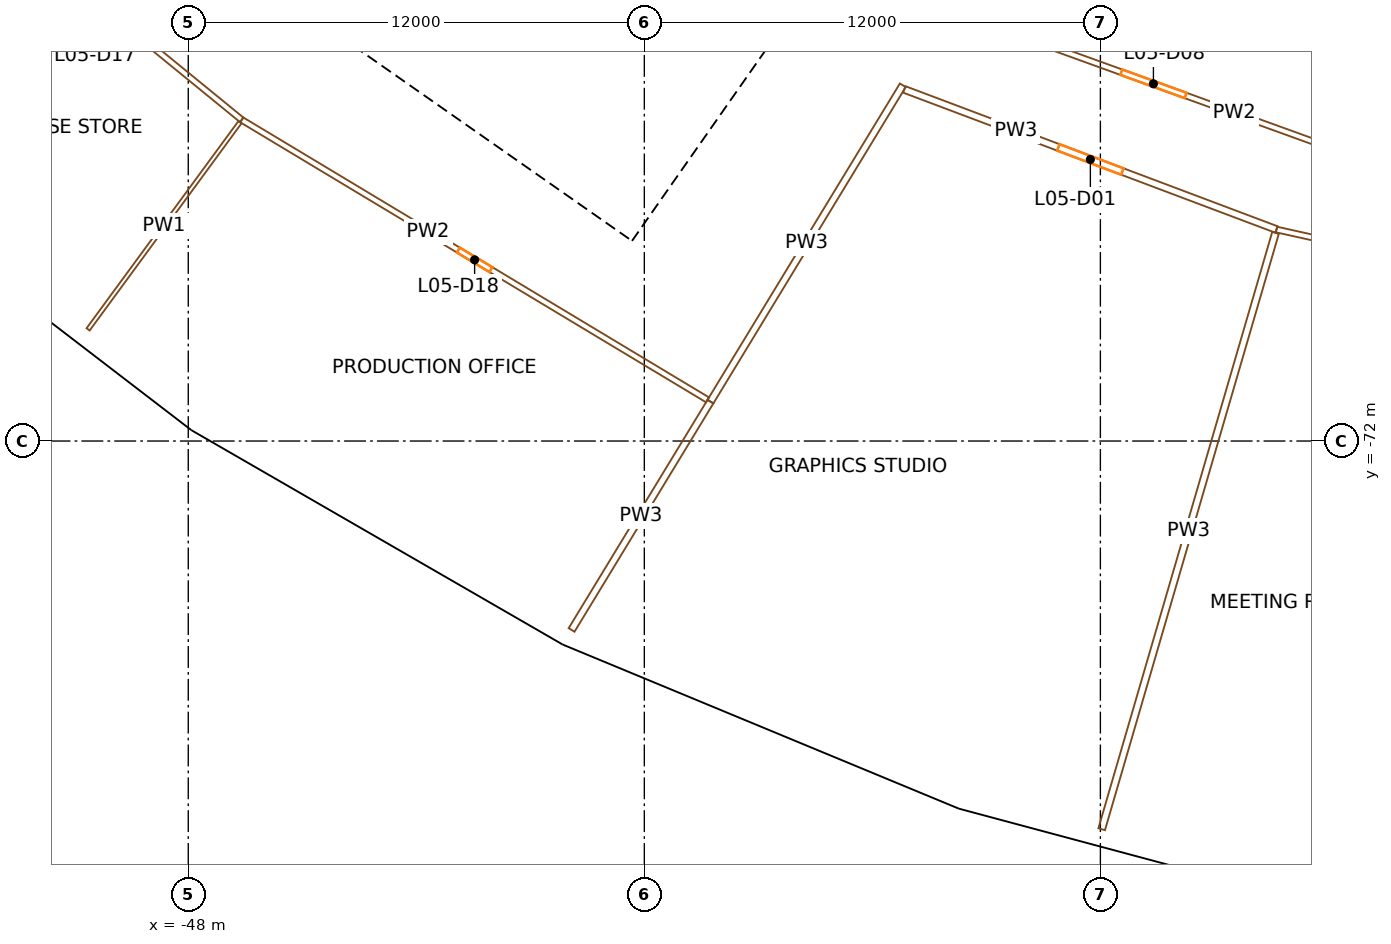
"""IFC4 building model, lengths in metres.
Left out: names, types, materials, properties, quantities, classifications, styles, units other than length and angle.
Written with IfcOpenShell. Run it as: python <this file> out.ifc"""

import sys

from ifc_helpers import new_model, si_unit, direction, frame, frame_2d, origin, origin_2d, place, context, subcontext, project, spatial, rectangle, extrude, element, fill, save


model = new_model("IFC4")
c1 = context("Model", 3, precision=1e-05, world=origin(), true_north=direction((0.0, 1.0)))
c2 = subcontext(c1, "Body", "Model", "MODEL_VIEW")
j1 = project(units=[si_unit("LENGTHUNIT", "METRE"), si_unit("PLANEANGLEUNIT", "RADIAN")], contexts=[c1])
p1 = place(None, origin())
s1 = spatial("IfcSite", under=j1, at=p1, CompositionType="ELEMENT")
p2 = place(p1, origin())
s2 = spatial("IfcBuilding", under=s1, at=p2, CompositionType="ELEMENT")
p3 = place(p2, frame((0.0, 0.0, 36.0)))
s3 = spatial("IfcBuildingStorey", under=s2, at=p3, CompositionType="ELEMENT", Elevation=36.0)
p4 = place(p3, frame((-43.196, -64.647, 0.0), z_axis=(0.0, 0.0, 1.0), x_axis=(0.831469612303, -0.55557023302, 0.0)))
e1 = element("IfcColumn", 1, at=p4, inside=s3, PredefinedType="COLUMN", context=c2, shape_type="SweptSolid", body=[
    extrude(rectangle(XDim=1.4, YDim=1.8, at=origin_2d()), origin(), (0.0, 0.0, 1.0), 4.5),
])
p5 = place(p3, frame((-47.362, -70.883, 0.0), z_axis=(0.0, 0.0, 1.0), x_axis=(0.831469612303, -0.55557023302, 0.0)))
e2 = element("IfcColumn", 2, at=p5, inside=s3, PredefinedType="COLUMN", context=c2, shape_type="SweptSolid", body=[
    extrude(rectangle(XDim=1.1, YDim=1.3, at=origin_2d()), origin(), (0.0, 0.0, 1.0), 4.5),
])
p6 = place(p3, frame((-34.388, -69.732, 0.0), z_axis=(0.0, 0.0, 1.0), x_axis=(0.896872741533, -0.442288690219, 0.0)))
e3 = element("IfcColumn", 3, at=p6, inside=s3, PredefinedType="COLUMN", context=c2, shape_type="SweptSolid", body=[
    extrude(rectangle(XDim=1.4, YDim=1.8, at=origin_2d()), origin(), (0.0, 0.0, 1.0), 4.5),
])
p7 = place(p3, frame((-37.705, -76.458, 0.0), z_axis=(0.0, 0.0, 1.0), x_axis=(0.896872741533, -0.442288690219, 0.0)))
e4 = element("IfcColumn", 4, at=p7, inside=s3, PredefinedType="COLUMN", context=c2, shape_type="SweptSolid", body=[
    extrude(rectangle(XDim=1.1, YDim=1.3, at=origin_2d()), origin(), (0.0, 0.0, 1.0), 4.5),
])
p8 = place(p3, frame((-24.992, -73.624, 0.0), z_axis=(0.0, 0.0, 1.0), x_axis=(0.946930129495, -0.321439465303, 0.0)))
e5 = element("IfcColumn", 5, at=p8, inside=s3, PredefinedType="COLUMN", context=c2, shape_type="SweptSolid", body=[
    extrude(rectangle(XDim=1.4, YDim=1.8, at=origin_2d()), origin(), (0.0, 0.0, 1.0), 4.5),
])
p9 = place(p3, frame((-27.403, -80.726, 0.0), z_axis=(0.0, 0.0, 1.0), x_axis=(0.946930129495, -0.321439465303, 0.0)))
e6 = element("IfcColumn", 6, at=p9, inside=s3, PredefinedType="COLUMN", context=c2, shape_type="SweptSolid", body=[
    extrude(rectangle(XDim=1.1, YDim=1.3, at=origin_2d()), origin(), (0.0, 0.0, 1.0), 4.5),
])
p10 = place(p3, frame((-36.717, -66.337, 0.0), z_axis=(0.0, 0.0, 1.0), x_axis=(0.573577477574, 0.819151315216, 0.0)))
e7 = element("IfcWall", 7, at=p10, inside=s3, PredefinedType="SHEAR", context=c2, shape_type="SweptSolid", body=[
    extrude(rectangle(XDim=14.8, YDim=0.9, at=frame_2d((7.4, 0.0))), origin(), (0.0, 0.0, 1.0), 4.2),
])
p11 = place(p10, frame((6.2, 0.0, 0.0)))
e8 = element("IfcOpeningElement", 8, at=p11, cuts=e7, PredefinedType="OPENING", context=c2, shape_type="SweptSolid", body=[
    extrude(rectangle(XDim=2.4, YDim=2.1, at=frame_2d((1.2, 1.05))), frame((0.0, 0.46, 0.0), z_axis=(0.0, -1.0, 0.0), x_axis=(1.0, 0.0, 0.0)), (0.0, 0.0, 1.0), 0.92),
])
p12 = place(p3, frame((-36.827, -65.71, 0.0), z_axis=(0.0, 0.0, 1.0), x_axis=(-0.819153391756, 0.573574511963, 0.0)))
e9 = element("IfcWall", 9, at=p12, inside=s3, PredefinedType="SHEAR", context=c2, shape_type="SweptSolid", body=[
    extrude(rectangle(XDim=15.045, YDim=0.9, at=frame_2d((7.523, 0.0))), origin(), (0.0, 0.0, 1.0), 4.2),
])
p13 = place(p12, frame((0.6, 0.0, 0.0)))
e10 = element("IfcOpeningElement", 10, at=p13, cuts=e9, PredefinedType="OPENING", context=c2, shape_type="SweptSolid", body=[
    extrude(rectangle(XDim=1.0, YDim=2.1, at=frame_2d((0.5, 1.05))), frame((0.0, 0.46, 0.0), z_axis=(0.0, -1.0, 0.0), x_axis=(1.0, 0.0, 0.0)), (0.0, 0.0, 1.0), 0.92),
])
p14 = place(p12, frame((3.275, 0.0, 0.0)))
e11 = element("IfcOpeningElement", 11, at=p14, cuts=e9, PredefinedType="OPENING", context=c2, shape_type="SweptSolid", body=[
    extrude(rectangle(XDim=1.0, YDim=2.1, at=frame_2d((0.5, 1.05))), frame((0.0, 0.46, 0.0), z_axis=(0.0, -1.0, 0.0), x_axis=(1.0, 0.0, 0.0)), (0.0, 0.0, 1.0), 0.92),
])
p15 = place(p12, frame((6.175, 0.0, 0.0)))
e12 = element("IfcOpeningElement", 12, at=p15, cuts=e9, PredefinedType="OPENING", context=c2, shape_type="SweptSolid", body=[
    extrude(rectangle(XDim=1.0, YDim=2.1, at=frame_2d((0.5, 1.05))), frame((0.0, 0.46, 0.0), z_axis=(0.0, -1.0, 0.0), x_axis=(1.0, 0.0, 0.0)), (0.0, 0.0, 1.0), 0.92),
])
p16 = place(p12, frame((13.495, 0.0, 0.0)))
e13 = element("IfcOpeningElement", 13, at=p16, cuts=e9, PredefinedType="OPENING", context=c2, shape_type="SweptSolid", body=[
    extrude(rectangle(XDim=1.1, YDim=2.1, at=frame_2d((0.55, 1.05))), frame((0.0, 0.46, 0.0), z_axis=(0.0, -1.0, 0.0), x_axis=(1.0, 0.0, 0.0)), (0.0, 0.0, 1.0), 0.92),
])
p17 = place(p3, frame((-35.221, -63.417, 0.0), z_axis=(0.0, 0.0, 1.0), x_axis=(-0.819166993208, 0.573555086491, 0.0)))
e14 = element("IfcWall", 14, at=p17, inside=s3, PredefinedType="SOLIDWALL", context=c2, shape_type="SweptSolid", body=[
    extrude(rectangle(XDim=7.95, YDim=0.3, at=frame_2d((3.975, 0.0))), origin(), (0.0, 0.0, 1.0), 4.2),
])
p18 = place(p3, frame((-35.635, -60.258, 0.0), z_axis=(0.0, 0.0, 1.0), x_axis=(-0.573581496053, -0.819148501424, 0.0)))
e15 = element("IfcWall", 15, at=p18, inside=s3, PredefinedType="PARTITIONING", context=c2, shape_type="SweptSolid", body=[
    extrude(rectangle(XDim=2.2, YDim=0.15, at=frame_2d((1.1, 0.0))), origin(), (0.0, 0.0, 1.0), 4.2),
])
for number, where, z_axis, x_axis in (
    (16, (-37.15, -62.249, 0.0), (0.0, 0.0, 1.0), (-0.574, -0.819, 0.0)),
    (17, (-39.649, -60.5, 0.0), (0.0, 0.0, 1.0), (-0.574, -0.819, 0.0)),
):
    element("IfcWall", number, at=place(p3, frame(where, z_axis=z_axis, x_axis=x_axis)), inside=s3, PredefinedType="PLUMBINGWALL", context=c2, shape_type="SweptSolid", body=[
        extrude(rectangle(XDim=2.2, YDim=0.1, at=frame_2d((1.1, 0.0))), origin(), (0.0, 0.0, 1.0), 4.2),
    ])
p19 = place(p3, frame((-56.673, -64.713, 0.0), z_axis=(0.0, 0.0, 1.0), x_axis=(0.793355377778, -0.608758773695, 0.0)))
e18 = element("IfcWall", 18, at=p19, inside=s3, PredefinedType="SOLIDWALL", context=c2, shape_type="SweptSolid", body=[
    extrude(rectangle(XDim=11.135, YDim=0.45, at=frame_2d((5.567, 0.0))), origin(), (0.0, 0.0, 1.0), 3.2),
])
p20 = place(p19, frame((3.917, 0.0, 0.9)))
e19 = element("IfcOpeningElement", 19, at=p20, cuts=e18, PredefinedType="OPENING", context=c2, shape_type="SweptSolid", body=[
    extrude(rectangle(XDim=1.2, YDim=2.15, at=frame_2d((0.6, 1.075))), frame((0.0, 0.235, 0.0), z_axis=(0.0, -1.0, 0.0), x_axis=(1.0, 0.0, 0.0)), (0.0, 0.0, 1.0), 0.47),
])
p21 = place(p19, frame((6.017, 0.0, 0.9)))
e20 = element("IfcOpeningElement", 20, at=p21, cuts=e18, PredefinedType="OPENING", context=c2, shape_type="SweptSolid", body=[
    extrude(rectangle(XDim=1.2, YDim=2.15, at=frame_2d((0.6, 1.075))), frame((0.0, 0.235, 0.0), z_axis=(0.0, -1.0, 0.0), x_axis=(1.0, 0.0, 0.0)), (0.0, 0.0, 1.0), 0.47),
])
p22 = place(p3, frame((-47.819, -71.512, 0.0), z_axis=(0.0, 0.0, 1.0), x_axis=(0.866024577697, -0.500001430823, 0.0)))
e21 = element("IfcWall", 21, at=p22, inside=s3, PredefinedType="SOLIDWALL", context=c2, shape_type="SweptSolid", body=[
    extrude(rectangle(XDim=11.312, YDim=0.45, at=frame_2d((5.656, 0.0))), origin(), (0.0, 0.0, 1.0), 3.2),
])
p23 = place(p22, frame((4.006, 0.0, 0.9)))
e22 = element("IfcOpeningElement", 22, at=p23, cuts=e21, PredefinedType="OPENING", context=c2, shape_type="SweptSolid", body=[
    extrude(rectangle(XDim=1.2, YDim=2.15, at=frame_2d((0.6, 1.075))), frame((0.0, 0.235, 0.0), z_axis=(0.0, -1.0, 0.0), x_axis=(1.0, 0.0, 0.0)), (0.0, 0.0, 1.0), 0.47),
])
p24 = place(p22, frame((6.106, 0.0, 0.9)))
e23 = element("IfcOpeningElement", 23, at=p24, cuts=e21, PredefinedType="OPENING", context=c2, shape_type="SweptSolid", body=[
    extrude(rectangle(XDim=1.2, YDim=2.15, at=frame_2d((0.6, 1.075))), frame((0.0, 0.235, 0.0), z_axis=(0.0, -1.0, 0.0), x_axis=(1.0, 0.0, 0.0)), (0.0, 0.0, 1.0), 0.47),
])
p25 = place(p3, frame((-37.993, -77.176, 0.0), z_axis=(0.0, 0.0, 1.0), x_axis=(0.923874126662, -0.382696482978, 0.0)))
e24 = element("IfcWall", 24, at=p25, inside=s3, PredefinedType="SOLIDWALL", context=c2, shape_type="SweptSolid", body=[
    extrude(rectangle(XDim=11.135, YDim=0.45, at=frame_2d((5.567, 0.0))), origin(), (0.0, 0.0, 1.0), 3.2),
])
p26 = place(p25, frame((3.917, 0.0, 0.9)))
e25 = element("IfcOpeningElement", 25, at=p26, cuts=e24, PredefinedType="OPENING", context=c2, shape_type="SweptSolid", body=[
    extrude(rectangle(XDim=1.2, YDim=2.15, at=frame_2d((0.6, 1.075))), frame((0.0, 0.235, 0.0), z_axis=(0.0, -1.0, 0.0), x_axis=(1.0, 0.0, 0.0)), (0.0, 0.0, 1.0), 0.47),
])
p27 = place(p25, frame((6.017, 0.0, 0.9)))
e26 = element("IfcOpeningElement", 26, at=p27, cuts=e24, PredefinedType="OPENING", context=c2, shape_type="SweptSolid", body=[
    extrude(rectangle(XDim=1.2, YDim=2.15, at=frame_2d((0.6, 1.075))), frame((0.0, 0.235, 0.0), z_axis=(0.0, -1.0, 0.0), x_axis=(1.0, 0.0, 0.0)), (0.0, 0.0, 1.0), 0.47),
])
p28 = place(p3, frame((-27.681, -81.451, 0.0), z_axis=(0.0, 0.0, 1.0), x_axis=(0.965923678926, -0.258827059038, 0.0)))
e27 = element("IfcWall", 27, at=p28, inside=s3, PredefinedType="SOLIDWALL", context=c2, shape_type="SweptSolid", body=[
    extrude(rectangle(XDim=11.312, YDim=0.45, at=frame_2d((5.656, 0.0))), origin(), (0.0, 0.0, 1.0), 3.2),
])
p29 = place(p28, frame((4.006, 0.0, 0.9)))
e28 = element("IfcOpeningElement", 28, at=p29, cuts=e27, PredefinedType="OPENING", context=c2, shape_type="SweptSolid", body=[
    extrude(rectangle(XDim=1.2, YDim=2.15, at=frame_2d((0.6, 1.075))), frame((0.0, 0.235, 0.0), z_axis=(0.0, -1.0, 0.0), x_axis=(1.0, 0.0, 0.0)), (0.0, 0.0, 1.0), 0.47),
])
p30 = place(p28, frame((6.106, 0.0, 0.9)))
e29 = element("IfcOpeningElement", 29, at=p30, cuts=e27, PredefinedType="OPENING", context=c2, shape_type="SweptSolid", body=[
    extrude(rectangle(XDim=1.2, YDim=2.15, at=frame_2d((0.6, 1.075))), frame((0.0, 0.235, 0.0), z_axis=(0.0, -1.0, 0.0), x_axis=(1.0, 0.0, 0.0)), (0.0, 0.0, 1.0), 0.47),
])
p31 = place(p3, frame((-46.594, -63.549, 0.0), z_axis=(0.0, 0.0, 1.0), x_axis=(-0.774664810718, 0.632372066931, 0.0)))
e30 = element("IfcWall", 30, at=p31, inside=s3, PredefinedType="PARTITIONING", context=c2, shape_type="SweptSolid", body=[
    extrude(rectangle(XDim=8.112, YDim=0.15, at=frame_2d((4.056, 0.0))), origin(), (0.0, 0.0, 1.0), 3.1),
])
p32 = place(p31, frame((3.556, 0.0, 0.0)))
e31 = element("IfcOpeningElement", 31, at=p32, cuts=e30, PredefinedType="OPENING", context=c2, shape_type="SweptSolid", body=[
    extrude(rectangle(XDim=1.0, YDim=2.1, at=frame_2d((0.5, 1.05))), frame((0.0, 0.085, 0.0), z_axis=(0.0, -1.0, 0.0), x_axis=(1.0, 0.0, 0.0)), (0.0, 0.0, 1.0), 0.17),
])
p33 = place(p3, frame((-50.635, -69.062, 0.0), z_axis=(0.0, 0.0, 1.0), x_axis=(0.591304174152, 0.806448618097, 0.0)))
e32 = element("IfcWall", 32, at=p33, inside=s3, PredefinedType="PARTITIONING", context=c2, shape_type="SweptSolid", body=[
    extrude(rectangle(XDim=6.761, YDim=0.1, at=frame_2d((3.38, 0.0))), origin(), (0.0, 0.0, 1.0), 3.1),
])
p34 = place(p3, frame((-34.337, -70.916, 0.0), z_axis=(0.0, 0.0, 1.0), x_axis=(-0.857079893963, 0.515183516199, 0.0)))
e33 = element("IfcWall", 33, at=p34, inside=s3, PredefinedType="PARTITIONING", context=c2, shape_type="SweptSolid", body=[
    extrude(rectangle(XDim=14.3, YDim=0.15, at=frame_2d((7.15, 0.0))), origin(), (0.0, 0.0, 1.0), 3.1),
])
p35 = place(p34, frame((6.65, 0.0, 0.0)))
e34 = element("IfcOpeningElement", 34, at=p35, cuts=e33, PredefinedType="OPENING", context=c2, shape_type="SweptSolid", body=[
    extrude(rectangle(XDim=1.0, YDim=2.1, at=frame_2d((0.5, 1.05))), frame((0.0, 0.085, 0.0), z_axis=(0.0, -1.0, 0.0), x_axis=(1.0, 0.0, 0.0)), (0.0, 0.0, 1.0), 0.17),
])
p36 = place(p3, frame((-34.26, -70.963, 0.0), z_axis=(0.0, 0.0, 1.0), x_axis=(-0.519582317334, -0.854420397412, 0.0)))
e35 = element("IfcWall", 35, at=p36, inside=s3, PredefinedType="PARTITIONING", context=c2, shape_type="SweptSolid", body=[
    extrude(rectangle(XDim=7.032, YDim=0.18, at=frame_2d((3.516, 0.0))), origin(), (0.0, 0.0, 1.0), 3.1),
])
p37 = place(p3, frame((-29.199, -62.639, 0.0), z_axis=(0.0, 0.0, 1.0), x_axis=(-0.519569231187, -0.854428355103, 0.0)))
e36 = element("IfcWall", 36, at=p37, inside=s3, PredefinedType="PARTITIONING", context=c2, shape_type="SweptSolid", body=[
    extrude(rectangle(XDim=9.741, YDim=0.18, at=frame_2d((4.871, 0.0))), origin(), (0.0, 0.0, 1.0), 3.1),
])
p38 = place(p3, frame((-19.366, -66.435, 0.0), z_axis=(0.0, 0.0, 1.0), x_axis=(-0.935901890315, 0.352260772305, 0.0)))
e37 = element("IfcWall", 37, at=p38, inside=s3, PredefinedType="PARTITIONING", context=c2, shape_type="SweptSolid", body=[
    extrude(rectangle(XDim=10.466, YDim=0.18, at=frame_2d((5.233, 0.0))), origin(), (0.0, 0.0, 1.0), 3.1),
])
p39 = place(p38, frame((4.333, 0.0, 0.0)))
e38 = element("IfcOpeningElement", 38, at=p39, cuts=e37, PredefinedType="OPENING", context=c2, shape_type="SweptSolid", body=[
    extrude(rectangle(XDim=1.8, YDim=2.4, at=frame_2d((0.9, 1.2))), frame((0.0, 0.1, 0.0), z_axis=(0.0, -1.0, 0.0), x_axis=(1.0, 0.0, 0.0)), (0.0, 0.0, 1.0), 0.2),
])
p40 = place(p3, frame((-27.92, -60.678, 0.0), z_axis=(0.0, 0.0, 1.0), x_axis=(0.940369024046, -0.340155991589, 0.0)))
e39 = element("IfcWall", 39, at=p40, inside=s3, PredefinedType="PARTITIONING", context=c2, shape_type="SweptSolid", body=[
    extrude(rectangle(XDim=11.305, YDim=0.15, at=frame_2d((5.652, 0.0))), origin(), (0.0, 0.0, 1.0), 3.1),
])
p41 = place(p40, frame((4.752, 0.0, 0.0)))
e40 = element("IfcOpeningElement", 40, at=p41, cuts=e39, PredefinedType="OPENING", context=c2, shape_type="SweptSolid", body=[
    extrude(rectangle(XDim=1.8, YDim=2.1, at=frame_2d((0.9, 1.05))), frame((0.0, 0.085, 0.0), z_axis=(0.0, -1.0, 0.0), x_axis=(1.0, 0.0, 0.0)), (0.0, 0.0, 1.0), 0.17),
])
p42 = place(p3, frame((-23.966, -82.214, 0.0), z_axis=(0.0, 0.0, 1.0), x_axis=(0.279852024748, 0.960043147074, 0.0)))
e41 = element("IfcWall", 41, at=p42, inside=s3, PredefinedType="PARTITIONING", context=c2, shape_type="SweptSolid", body=[
    extrude(rectangle(XDim=16.346, YDim=0.18, at=frame_2d((8.173, 0.0))), origin(), (0.0, 0.0, 1.0), 3.1),
])
p43 = place(p3, frame((-10.529, -68.394, 0.0), z_axis=(0.0, 0.0, 1.0), x_axis=(-0.976288493125, 0.216473504595, 0.0)))
e42 = element("IfcWall", 42, at=p43, inside=s3, PredefinedType="PARTITIONING", context=c2, shape_type="SweptSolid", body=[
    extrude(rectangle(XDim=9.052, YDim=0.15, at=frame_2d((4.526, 0.0))), origin(), (0.0, 0.0, 1.0), 3.1),
])
p44 = place(p43, frame((3.626, 0.0, 0.0)))
e43 = element("IfcOpeningElement", 43, at=p44, cuts=e42, PredefinedType="OPENING", context=c2, shape_type="SweptSolid", body=[
    extrude(rectangle(XDim=1.8, YDim=2.1, at=frame_2d((0.9, 1.05))), frame((0.0, 0.085, 0.0), z_axis=(0.0, -1.0, 0.0), x_axis=(1.0, 0.0, 0.0)), (0.0, 0.0, 1.0), 0.17),
])
p45 = place(p13, origin())
e44 = element("IfcDoor", 44, at=p45, inside=s3, OperationType="SINGLE_SWING_RIGHT", PredefinedType="DOOR", context=c2, shape_type="SweptSolid", body=[
    extrude(rectangle(XDim=1.0, YDim=2.1, at=frame_2d((0.5, 1.05))), frame((0.0, 0.025, 0.0), z_axis=(0.0, -1.0, 0.0), x_axis=(1.0, 0.0, 0.0)), (0.0, 0.0, 1.0), 0.05),
])
fill(e10, e44)
p46 = place(p14, origin())
e45 = element("IfcDoor", 45, at=p46, inside=s3, OperationType="SINGLE_SWING_LEFT", PredefinedType="DOOR", context=c2, shape_type="SweptSolid", body=[
    extrude(rectangle(XDim=1.0, YDim=2.1, at=frame_2d((0.5, 1.05))), frame((0.0, 0.025, 0.0), z_axis=(0.0, -1.0, 0.0), x_axis=(1.0, 0.0, 0.0)), (0.0, 0.0, 1.0), 0.05),
])
fill(e11, e45)
p47 = place(p15, origin())
e46 = element("IfcDoor", 46, at=p47, inside=s3, OperationType="SINGLE_SWING_RIGHT", PredefinedType="DOOR", context=c2, shape_type="SweptSolid", body=[
    extrude(rectangle(XDim=1.0, YDim=2.1, at=frame_2d((0.5, 1.05))), frame((0.0, 0.025, 0.0), z_axis=(0.0, -1.0, 0.0), x_axis=(1.0, 0.0, 0.0)), (0.0, 0.0, 1.0), 0.05),
])
fill(e12, e46)
p48 = place(p21, origin())
e47 = element("IfcWindow", 47, at=p48, inside=s3, PartitioningType="SINGLE_PANEL", PredefinedType="WINDOW", context=c2, shape_type="SweptSolid", body=[
    extrude(rectangle(XDim=1.2, YDim=2.15, at=frame_2d((0.6, 1.075))), frame((0.0, 0.03, 0.0), z_axis=(0.0, -1.0, 0.0), x_axis=(1.0, 0.0, 0.0)), (0.0, 0.0, 1.0), 0.06),
])
fill(e20, e47)
p49 = place(p23, origin())
e48 = element("IfcWindow", 48, at=p49, inside=s3, PartitioningType="SINGLE_PANEL", PredefinedType="WINDOW", context=c2, shape_type="SweptSolid", body=[
    extrude(rectangle(XDim=1.2, YDim=2.15, at=frame_2d((0.6, 1.075))), frame((0.0, 0.03, 0.0), z_axis=(0.0, -1.0, 0.0), x_axis=(1.0, 0.0, 0.0)), (0.0, 0.0, 1.0), 0.06),
])
fill(e22, e48)
p50 = place(p24, origin())
e49 = element("IfcWindow", 49, at=p50, inside=s3, PartitioningType="SINGLE_PANEL", PredefinedType="WINDOW", context=c2, shape_type="SweptSolid", body=[
    extrude(rectangle(XDim=1.2, YDim=2.15, at=frame_2d((0.6, 1.075))), frame((0.0, 0.03, 0.0), z_axis=(0.0, -1.0, 0.0), x_axis=(1.0, 0.0, 0.0)), (0.0, 0.0, 1.0), 0.06),
])
fill(e23, e49)
p51 = place(p26, origin())
e50 = element("IfcWindow", 50, at=p51, inside=s3, PartitioningType="SINGLE_PANEL", PredefinedType="WINDOW", context=c2, shape_type="SweptSolid", body=[
    extrude(rectangle(XDim=1.2, YDim=2.15, at=frame_2d((0.6, 1.075))), frame((0.0, 0.03, 0.0), z_axis=(0.0, -1.0, 0.0), x_axis=(1.0, 0.0, 0.0)), (0.0, 0.0, 1.0), 0.06),
])
fill(e25, e50)
p52 = place(p27, origin())
e51 = element("IfcWindow", 51, at=p52, inside=s3, PartitioningType="SINGLE_PANEL", PredefinedType="WINDOW", context=c2, shape_type="SweptSolid", body=[
    extrude(rectangle(XDim=1.2, YDim=2.15, at=frame_2d((0.6, 1.075))), frame((0.0, 0.03, 0.0), z_axis=(0.0, -1.0, 0.0), x_axis=(1.0, 0.0, 0.0)), (0.0, 0.0, 1.0), 0.06),
])
fill(e26, e51)
p53 = place(p29, origin())
e52 = element("IfcWindow", 52, at=p53, inside=s3, PartitioningType="SINGLE_PANEL", PredefinedType="WINDOW", context=c2, shape_type="SweptSolid", body=[
    extrude(rectangle(XDim=1.2, YDim=2.15, at=frame_2d((0.6, 1.075))), frame((0.0, 0.03, 0.0), z_axis=(0.0, -1.0, 0.0), x_axis=(1.0, 0.0, 0.0)), (0.0, 0.0, 1.0), 0.06),
])
fill(e28, e52)
p54 = place(p30, origin())
e53 = element("IfcWindow", 53, at=p54, inside=s3, PartitioningType="SINGLE_PANEL", PredefinedType="WINDOW", context=c2, shape_type="SweptSolid", body=[
    extrude(rectangle(XDim=1.2, YDim=2.15, at=frame_2d((0.6, 1.075))), frame((0.0, 0.03, 0.0), z_axis=(0.0, -1.0, 0.0), x_axis=(1.0, 0.0, 0.0)), (0.0, 0.0, 1.0), 0.06),
])
fill(e29, e53)
p55 = place(p39, origin())
e54 = element("IfcDoor", 54, at=p55, inside=s3, OperationType="DOUBLE_DOOR_SINGLE_SWING", PredefinedType="DOOR", context=c2, shape_type="SweptSolid", body=[
    extrude(rectangle(XDim=1.8, YDim=2.4, at=frame_2d((0.9, 1.2))), frame((0.0, 0.025, 0.0), z_axis=(0.0, -1.0, 0.0), x_axis=(1.0, 0.0, 0.0)), (0.0, 0.0, 1.0), 0.05),
])
fill(e38, e54)
p56 = place(p41, origin())
e55 = element("IfcDoor", 55, at=p56, inside=s3, OperationType="DOUBLE_DOOR_SINGLE_SWING", PredefinedType="DOOR", context=c2, shape_type="SweptSolid", body=[
    extrude(rectangle(XDim=1.8, YDim=2.1, at=frame_2d((0.9, 1.05))), frame((0.0, 0.025, 0.0), z_axis=(0.0, -1.0, 0.0), x_axis=(1.0, 0.0, 0.0)), (0.0, 0.0, 1.0), 0.05),
])
fill(e40, e55)
p57 = place(p35, origin())
e56 = element("IfcDoor", 56, at=p57, inside=s3, OperationType="SINGLE_SWING_RIGHT", PredefinedType="DOOR", context=c2, shape_type="SweptSolid", body=[
    extrude(rectangle(XDim=1.0, YDim=2.1, at=frame_2d((0.5, 1.05))), frame((0.0, 0.025, 0.0), z_axis=(0.0, -1.0, 0.0), x_axis=(1.0, 0.0, 0.0)), (0.0, 0.0, 1.0), 0.05),
])
fill(e34, e56)
save(model, sys.argv[1])
